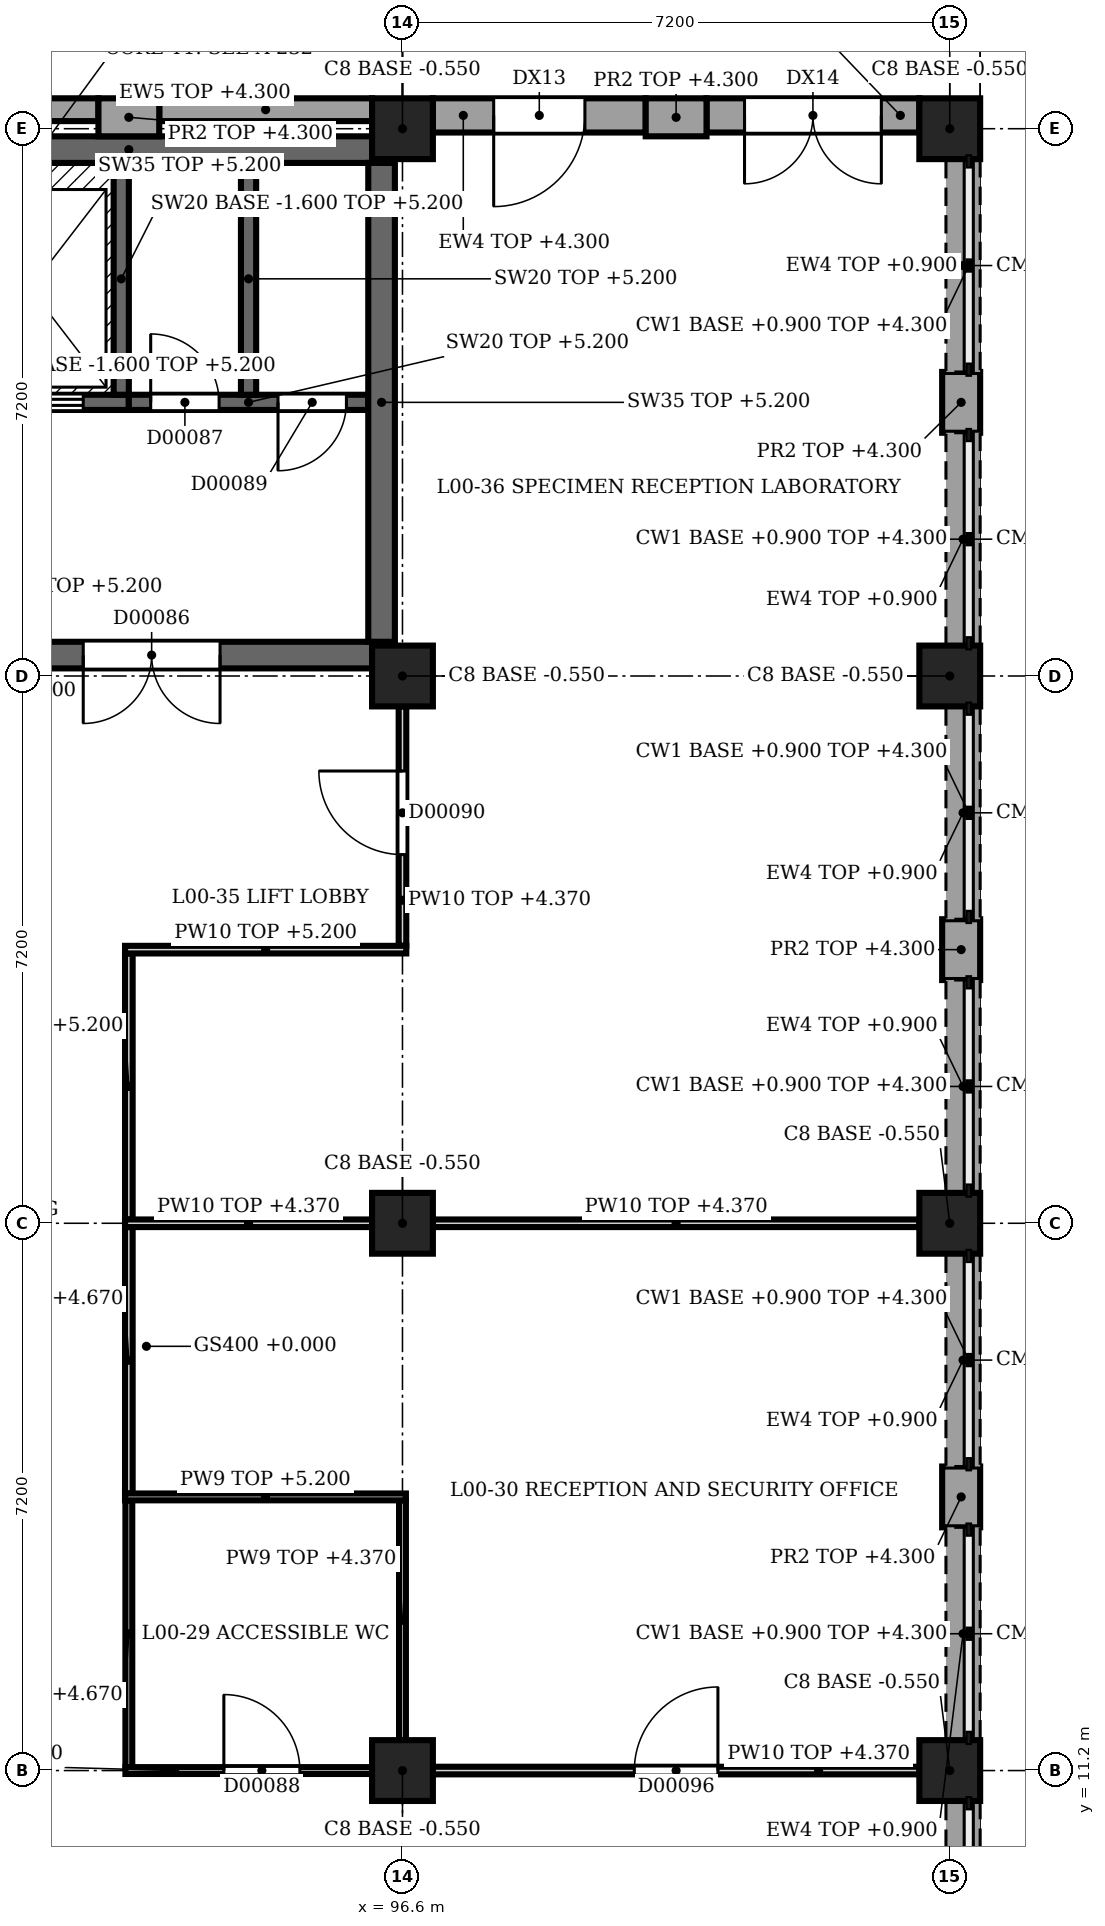
"""IFC4 building model, lengths in metres.
Left out: names, types, materials, properties, quantities, classifications, styles, units other than length and angle.
Written with IfcOpenShell. Run it as: python <this file> out.ifc"""

import sys

from ifc_helpers import new_model, si_unit, direction, frame, frame_2d, origin, origin_2d, place, context, subcontext, project, spatial, rectangle, extrude, element, fill, save


model = new_model("IFC4")
c1 = context("Model", 3, precision=1e-05, world=origin(), true_north=direction((0.0, 1.0)))
c2 = subcontext(c1, "Body", "Model", "MODEL_VIEW")
j1 = project(units=[si_unit("LENGTHUNIT", "METRE"), si_unit("PLANEANGLEUNIT", "RADIAN")], contexts=[c1])
p1 = place(None, origin())
s1 = spatial("IfcSite", under=j1, at=p1, CompositionType="ELEMENT")
p2 = place(p1, origin())
s2 = spatial("IfcBuilding", under=s1, at=p2, CompositionType="ELEMENT")
p3 = place(p2, origin())
s3 = spatial("IfcBuildingStorey", under=s2, at=p3, CompositionType="ELEMENT", Elevation=0.0)
for number, where, z_axis, x_axis in (
    (1, (96.6, 11.2, -0.55), (0.0, 0.0, 1.0), (1.0, 0.0, 0.0)),
    (2, (96.6, 18.4, -0.55), (0.0, 0.0, 1.0), (1.0, 0.0, 0.0)),
    (3, (96.6, 25.6, -0.55), (0.0, 0.0, 1.0), (1.0, 0.0, 0.0)),
    (4, (96.6, 32.8, -0.55), (0.0, 0.0, 1.0), (1.0, 0.0, 0.0)),
    (5, (103.8, 11.2, -0.55), (0.0, 0.0, 1.0), (1.0, 0.0, 0.0)),
    (6, (103.8, 18.4, -0.55), (0.0, 0.0, 1.0), (1.0, 0.0, 0.0)),
    (7, (103.8, 25.6, -0.55), (0.0, 0.0, 1.0), (1.0, 0.0, 0.0)),
    (8, (103.8, 32.8, -0.55), (0.0, 0.0, 1.0), (1.0, 0.0, 0.0)),
):
    element("IfcColumn", number, at=place(p3, frame(where, z_axis=z_axis, x_axis=x_axis)), inside=s3, PredefinedType="COLUMN", context=c2, shape_type="SweptSolid", body=[
        extrude(rectangle(XDim=0.8, YDim=0.8, at=origin_2d()), origin(), (0.0, 0.0, 1.0), 5.95),
    ])
p4 = place(p3, frame((92.6, 32.95, 0.0), z_axis=(0.0, 0.0, 1.0), x_axis=(1.0, 0.0, 0.0)))
e9 = element("IfcWall", 9, at=p4, inside=s3, PredefinedType="SOLIDWALL", context=c2, shape_type="SweptSolid", body=[
    extrude(rectangle(XDim=0.8, YDim=0.5, at=frame_2d((0.4, 0.0))), origin(), (0.0, 0.0, 1.0), 4.3),
])
p5 = place(p3, frame((99.8, 32.95, 0.0), z_axis=(0.0, 0.0, 1.0), x_axis=(1.0, 0.0, 0.0)))
e10 = element("IfcWall", 10, at=p5, inside=s3, PredefinedType="SOLIDWALL", context=c2, shape_type="SweptSolid", body=[
    extrude(rectangle(XDim=0.8, YDim=0.5, at=frame_2d((0.4, 0.0))), origin(), (0.0, 0.0, 1.0), 4.3),
])
for number, where, z_axis, x_axis in (
    (11, (89.8, 33.05, 0.0), (0.0, 0.0, 1.0), (1.0, 0.0, 0.0)),
    (12, (93.4, 33.05, 0.0), (0.0, 0.0, 1.0), (1.0, 0.0, 0.0)),
):
    element("IfcWall", number, at=place(p3, frame(where, z_axis=z_axis, x_axis=x_axis)), inside=s3, PredefinedType="SOLIDWALL", context=c2, shape_type="SweptSolid", body=[
        extrude(rectangle(XDim=2.8, YDim=0.3, at=frame_2d((1.4, 0.0))), origin(), (0.0, 0.0, 1.0), 4.3),
    ])
p6 = place(p3, frame((97.0, 32.975, 0.0), z_axis=(0.0, 0.0, 1.0), x_axis=(1.0, 0.0, 0.0)))
e13 = element("IfcWall", 13, at=p6, inside=s3, PredefinedType="SOLIDWALL", context=c2, shape_type="SweptSolid", body=[
    extrude(rectangle(XDim=2.8, YDim=0.45, at=frame_2d((1.4, 0.0))), origin(), (0.0, 0.0, 1.0), 4.3),
])
p7 = place(p6, frame((0.8, 0.0, 0.0)))
e14 = element("IfcOpeningElement", 14, at=p7, cuts=e13, PredefinedType="OPENING", context=c2, shape_type="SweptSolid", body=[
    extrude(rectangle(XDim=1.2, YDim=2.2, at=frame_2d((0.6, 1.1))), frame((0.0, 0.235, 0.0), z_axis=(0.0, -1.0, 0.0), x_axis=(1.0, 0.0, 0.0)), (0.0, 0.0, 1.0), 0.47),
])
p8 = place(p3, frame((100.6, 32.975, 0.0), z_axis=(0.0, 0.0, 1.0), x_axis=(1.0, 0.0, 0.0)))
e15 = element("IfcWall", 15, at=p8, inside=s3, PredefinedType="SOLIDWALL", context=c2, shape_type="SweptSolid", body=[
    extrude(rectangle(XDim=2.8, YDim=0.45, at=frame_2d((1.4, 0.0))), origin(), (0.0, 0.0, 1.0), 4.3),
])
p9 = place(p8, frame((0.5, 0.0, 0.0)))
e16 = element("IfcOpeningElement", 16, at=p9, cuts=e15, PredefinedType="OPENING", context=c2, shape_type="SweptSolid", body=[
    extrude(rectangle(XDim=1.8, YDim=2.4, at=frame_2d((0.9, 1.2))), frame((0.0, 0.235, 0.0), z_axis=(0.0, -1.0, 0.0), x_axis=(1.0, 0.0, 0.0)), (0.0, 0.0, 1.0), 0.47),
])
p10 = place(p3, frame((103.95, 29.6, 0.0), z_axis=(0.0, 0.0, 1.0), x_axis=(0.0, -1.0, 0.0)))
e17 = element("IfcWall", 17, at=p10, inside=s3, PredefinedType="SOLIDWALL", context=c2, shape_type="SweptSolid", body=[
    extrude(rectangle(XDim=0.8, YDim=0.5, at=frame_2d((0.4, 0.0))), origin(), (0.0, 0.0, 1.0), 4.3),
])
p11 = place(p3, frame((103.95, 22.4, 0.0), z_axis=(0.0, 0.0, 1.0), x_axis=(0.0, -1.0, 0.0)))
e18 = element("IfcWall", 18, at=p11, inside=s3, PredefinedType="SOLIDWALL", context=c2, shape_type="SweptSolid", body=[
    extrude(rectangle(XDim=0.8, YDim=0.5, at=frame_2d((0.4, 0.0))), origin(), (0.0, 0.0, 1.0), 4.3),
])
p12 = place(p3, frame((103.95, 15.2, 0.0), z_axis=(0.0, 0.0, 1.0), x_axis=(0.0, -1.0, 0.0)))
e19 = element("IfcWall", 19, at=p12, inside=s3, PredefinedType="SOLIDWALL", context=c2, shape_type="SweptSolid", body=[
    extrude(rectangle(XDim=0.8, YDim=0.5, at=frame_2d((0.4, 0.0))), origin(), (0.0, 0.0, 1.0), 4.3),
])
p13 = place(p3, frame((103.975, 32.4, 0.0), z_axis=(0.0, 0.0, 1.0), x_axis=(0.0, -1.0, 0.0)))
e20 = element("IfcWall", 20, at=p13, inside=s3, PredefinedType="SOLIDWALL", context=c2, shape_type="SweptSolid", body=[
    extrude(rectangle(XDim=2.8, YDim=0.45, at=frame_2d((1.4, 0.0))), origin(), (0.0, 0.0, 1.0), 0.9),
])
for number, where, z_axis, x_axis in (
    (21, (103.975, 28.8, 0.0), (0.0, 0.0, 1.0), (0.0, -1.0, 0.0)),
    (22, (103.975, 25.2, 0.0), (0.0, 0.0, 1.0), (0.0, -1.0, 0.0)),
    (23, (103.975, 21.6, 0.0), (0.0, 0.0, 1.0), (0.0, -1.0, 0.0)),
    (24, (103.975, 18.0, 0.0), (0.0, 0.0, 1.0), (0.0, -1.0, 0.0)),
):
    element("IfcWall", number, at=place(p3, frame(where, z_axis=z_axis, x_axis=x_axis)), inside=s3, PredefinedType="SOLIDWALL", context=c2, shape_type="SweptSolid", body=[
        extrude(rectangle(XDim=2.8, YDim=0.45, at=frame_2d((1.4, 0.0))), origin(), (0.0, 0.0, 1.0), 0.9),
    ])
p14 = place(p3, frame((103.975, 14.4, 0.0), z_axis=(0.0, 0.0, 1.0), x_axis=(0.0, -1.0, 0.0)))
e25 = element("IfcWall", 25, at=p14, inside=s3, PredefinedType="SOLIDWALL", context=c2, shape_type="SweptSolid", body=[
    extrude(rectangle(XDim=2.8, YDim=0.45, at=frame_2d((1.4, 0.0))), origin(), (0.0, 0.0, 1.0), 0.9),
])
p15 = place(p3, frame((103.975, 10.8, 0.0), z_axis=(0.0, 0.0, 1.0), x_axis=(0.0, -1.0, 0.0)))
e26 = element("IfcWall", 26, at=p15, inside=s3, PredefinedType="SOLIDWALL", context=c2, shape_type="SweptSolid", body=[
    extrude(rectangle(XDim=2.8, YDim=0.45, at=frame_2d((1.4, 0.0))), origin(), (0.0, 0.0, 1.0), 0.9),
])
p16 = place(p3, frame((89.8, 25.875, 0.0), z_axis=(0.0, 0.0, 1.0), x_axis=(1.0, 0.0, 0.0)))
e27 = element("IfcWall", 27, at=p16, inside=s3, PredefinedType="SHEAR", context=c2, shape_type="SweptSolid", body=[
    extrude(rectangle(XDim=6.4, YDim=0.35, at=frame_2d((3.2, 0.0))), origin(), (0.0, 0.0, 1.0), 5.2),
])
p17 = place(p16, frame((2.6, 0.0, 0.0)))
e28 = element("IfcOpeningElement", 28, at=p17, cuts=e27, PredefinedType="OPENING", context=c2, shape_type="SweptSolid", body=[
    extrude(rectangle(XDim=1.8, YDim=2.1, at=frame_2d((0.9, 1.05))), frame((0.0, 0.185, 0.0), z_axis=(0.0, -1.0, 0.0), x_axis=(1.0, 0.0, 0.0)), (0.0, 0.0, 1.0), 0.37),
])
p18 = place(p3, frame((89.8, 32.525, 0.0), z_axis=(0.0, 0.0, 1.0), x_axis=(1.0, 0.0, 0.0)))
e29 = element("IfcWall", 29, at=p18, inside=s3, PredefinedType="SHEAR", context=c2, shape_type="SweptSolid", body=[
    extrude(rectangle(XDim=6.4, YDim=0.35, at=frame_2d((3.2, 0.0))), origin(), (0.0, 0.0, 1.0), 5.2),
])
p19 = place(p3, frame((96.325, 26.05, 0.0), z_axis=(0.0, 0.0, 1.0), x_axis=(0.0, 1.0, 0.0)))
e30 = element("IfcWall", 30, at=p19, inside=s3, PredefinedType="SHEAR", context=c2, shape_type="SweptSolid", body=[
    extrude(rectangle(XDim=6.3, YDim=0.35, at=frame_2d((3.15, 0.0))), origin(), (0.0, 0.0, 1.0), 5.2),
])
p20 = place(p3, frame((93.0, 29.2, -1.6), z_axis=(0.0, 0.0, 1.0), x_axis=(-1.0, 0.0, 0.0)))
e31 = element("IfcWall", 31, at=p20, inside=s3, PredefinedType="SHEAR", context=c2, shape_type="SweptSolid", body=[
    extrude(rectangle(XDim=7.2, YDim=0.2, at=frame_2d((3.6, 0.0))), origin(), (0.0, 0.0, 1.0), 6.8),
])
p21 = place(p20, frame((5.65, 0.0, 1.6)))
e32 = element("IfcOpeningElement", 32, at=p21, cuts=e31, PredefinedType="OPENING", context=c2, shape_type="SweptSolid", body=[
    extrude(rectangle(XDim=1.1, YDim=2.1, at=frame_2d((0.55, 1.05))), frame((0.0, 0.11, 0.0), z_axis=(0.0, -1.0, 0.0), x_axis=(1.0, 0.0, 0.0)), (0.0, 0.0, 1.0), 0.22),
])
p22 = place(p20, frame((3.45, 0.0, 1.6)))
e33 = element("IfcOpeningElement", 33, at=p22, cuts=e31, PredefinedType="OPENING", context=c2, shape_type="SweptSolid", body=[
    extrude(rectangle(XDim=1.1, YDim=2.1, at=frame_2d((0.55, 1.05))), frame((0.0, 0.11, 0.0), z_axis=(0.0, -1.0, 0.0), x_axis=(1.0, 0.0, 0.0)), (0.0, 0.0, 1.0), 0.22),
])
p23 = place(p20, frame((0.6, 0.0, 1.6)))
e34 = element("IfcOpeningElement", 34, at=p23, cuts=e31, PredefinedType="OPENING", context=c2, shape_type="SweptSolid", body=[
    extrude(rectangle(XDim=1.4, YDim=2.1, at=frame_2d((0.7, 1.05))), frame((0.0, 0.11, 0.0), z_axis=(0.0, -1.0, 0.0), x_axis=(1.0, 0.0, 0.0)), (0.0, 0.0, 1.0), 0.22),
])
p24 = place(p3, frame((96.15, 29.2, 0.0), z_axis=(0.0, 0.0, 1.0), x_axis=(-1.0, 0.0, 0.0)))
e35 = element("IfcWall", 35, at=p24, inside=s3, PredefinedType="SHEAR", context=c2, shape_type="SweptSolid", body=[
    extrude(rectangle(XDim=3.15, YDim=0.2, at=frame_2d((1.575, 0.0))), origin(), (0.0, 0.0, 1.0), 5.2),
])
p25 = place(p24, frame((1.962, 0.0, 0.0)))
e36 = element("IfcOpeningElement", 36, at=p25, cuts=e35, PredefinedType="OPENING", context=c2, shape_type="SweptSolid", body=[
    extrude(rectangle(XDim=0.9, YDim=2.1, at=frame_2d((0.45, 1.05))), frame((0.0, 0.11, 0.0), z_axis=(0.0, -1.0, 0.0), x_axis=(1.0, 0.0, 0.0)), (0.0, 0.0, 1.0), 0.22),
])
p26 = place(p24, frame((0.288, 0.0, 0.0)))
e37 = element("IfcOpeningElement", 37, at=p26, cuts=e35, PredefinedType="OPENING", context=c2, shape_type="SweptSolid", body=[
    extrude(rectangle(XDim=0.9, YDim=2.1, at=frame_2d((0.45, 1.05))), frame((0.0, 0.11, 0.0), z_axis=(0.0, -1.0, 0.0), x_axis=(1.0, 0.0, 0.0)), (0.0, 0.0, 1.0), 0.22),
])
p27 = place(p3, frame((92.9, 29.3, -1.6), z_axis=(0.0, 0.0, 1.0), x_axis=(0.0, 1.0, 0.0)))
e38 = element("IfcWall", 38, at=p27, inside=s3, PredefinedType="SHEAR", context=c2, shape_type="SweptSolid", body=[
    extrude(rectangle(XDim=3.05, YDim=0.2, at=frame_2d((1.525, 0.0))), origin(), (0.0, 0.0, 1.0), 6.8),
])
p28 = place(p3, frame((94.575, 29.3, 0.0), z_axis=(0.0, 0.0, 1.0), x_axis=(0.0, 1.0, 0.0)))
e39 = element("IfcWall", 39, at=p28, inside=s3, PredefinedType="SHEAR", context=c2, shape_type="SweptSolid", body=[
    extrude(rectangle(XDim=3.05, YDim=0.2, at=frame_2d((1.525, 0.0))), origin(), (0.0, 0.0, 1.0), 5.2),
])
p29 = place(p3, frame((92.955, 11.2, 0.0), z_axis=(0.0, 0.0, 1.0), x_axis=(1.0, 0.0, 0.0)))
e40 = element("IfcWall", 40, at=p29, inside=s3, PredefinedType="PARTITIONING", context=c2, shape_type="SweptSolid", body=[
    extrude(rectangle(XDim=3.245, YDim=0.09, at=frame_2d((1.623, 0.0))), origin(), (0.0, 0.0, 1.0), 4.37),
])
p30 = place(p29, frame((1.295, 0.0, 0.0)))
e41 = element("IfcOpeningElement", 41, at=p30, cuts=e40, PredefinedType="OPENING", context=c2, shape_type="SweptSolid", body=[
    extrude(rectangle(XDim=1.0, YDim=2.2, at=frame_2d((0.5, 1.1))), frame((0.0, 0.055, 0.0), z_axis=(0.0, -1.0, 0.0), x_axis=(1.0, 0.0, 0.0)), (0.0, 0.0, 1.0), 0.11),
])
p31 = place(p3, frame((97.0, 11.2, 0.0), z_axis=(0.0, 0.0, 1.0), x_axis=(1.0, 0.0, 0.0)))
e42 = element("IfcWall", 42, at=p31, inside=s3, PredefinedType="PARTITIONING", context=c2, shape_type="SweptSolid", body=[
    extrude(rectangle(XDim=6.4, YDim=0.1, at=frame_2d((3.2, 0.0))), origin(), (0.0, 0.0, 1.0), 4.37),
])
p32 = place(p31, frame((2.65, 0.0, 0.0)))
e43 = element("IfcOpeningElement", 43, at=p32, cuts=e42, PredefinedType="OPENING", context=c2, shape_type="SweptSolid", body=[
    extrude(rectangle(XDim=1.1, YDim=2.2, at=frame_2d((0.55, 1.1))), frame((0.0, 0.06, 0.0), z_axis=(0.0, -1.0, 0.0), x_axis=(1.0, 0.0, 0.0)), (0.0, 0.0, 1.0), 0.12),
])
p33 = place(p3, frame((92.95, 14.8, 0.0), z_axis=(0.0, 0.0, 1.0), x_axis=(1.0, 0.0, 0.0)))
e44 = element("IfcWall", 44, at=p33, inside=s3, PredefinedType="PARTITIONING", context=c2, shape_type="SweptSolid", body=[
    extrude(rectangle(XDim=3.695, YDim=0.09, at=frame_2d((1.848, 0.0))), origin(), (0.0, 0.0, 1.0), 5.2),
])
p34 = place(p3, frame((92.95, 18.4, 0.0), z_axis=(0.0, 0.0, 1.0), x_axis=(1.0, 0.0, 0.0)))
e45 = element("IfcWall", 45, at=p34, inside=s3, PredefinedType="PARTITIONING", context=c2, shape_type="SweptSolid", body=[
    extrude(rectangle(XDim=3.25, YDim=0.1, at=frame_2d((1.625, 0.0))), origin(), (0.0, 0.0, 1.0), 4.37),
])
p35 = place(p3, frame((97.0, 18.4, 0.0), z_axis=(0.0, 0.0, 1.0), x_axis=(1.0, 0.0, 0.0)))
e46 = element("IfcWall", 46, at=p35, inside=s3, PredefinedType="PARTITIONING", context=c2, shape_type="SweptSolid", body=[
    extrude(rectangle(XDim=6.4, YDim=0.1, at=frame_2d((3.2, 0.0))), origin(), (0.0, 0.0, 1.0), 4.37),
])
p36 = place(p3, frame((92.95, 22.0, 0.0), z_axis=(0.0, 0.0, 1.0), x_axis=(1.0, 0.0, 0.0)))
e47 = element("IfcWall", 47, at=p36, inside=s3, PredefinedType="PARTITIONING", context=c2, shape_type="SweptSolid", body=[
    extrude(rectangle(XDim=3.7, YDim=0.1, at=frame_2d((1.85, 0.0))), origin(), (0.0, 0.0, 1.0), 5.2),
])
p37 = place(p3, frame((93.0, 11.245, 0.0), z_axis=(0.0, 0.0, 1.0), x_axis=(0.0, 1.0, 0.0)))
e48 = element("IfcWall", 48, at=p37, inside=s3, PredefinedType="PARTITIONING", context=c2, shape_type="SweptSolid", body=[
    extrude(rectangle(XDim=3.51, YDim=0.09, at=frame_2d((1.755, 0.0))), origin(), (0.0, 0.0, 1.0), 4.67),
])
p38 = place(p3, frame((93.0, 14.845, 0.0), z_axis=(0.0, 0.0, 1.0), x_axis=(0.0, 1.0, 0.0)))
e49 = element("IfcWall", 49, at=p38, inside=s3, PredefinedType="PARTITIONING", context=c2, shape_type="SweptSolid", body=[
    extrude(rectangle(XDim=3.505, YDim=0.1, at=frame_2d((1.752, 0.0))), origin(), (0.0, 0.0, 1.0), 4.67),
])
p39 = place(p3, frame((93.0, 18.45, 0.0), z_axis=(0.0, 0.0, 1.0), x_axis=(0.0, 1.0, 0.0)))
e50 = element("IfcWall", 50, at=p39, inside=s3, PredefinedType="PARTITIONING", context=c2, shape_type="SweptSolid", body=[
    extrude(rectangle(XDim=3.5, YDim=0.1, at=frame_2d((1.75, 0.0))), origin(), (0.0, 0.0, 1.0), 5.2),
])
p40 = place(p3, frame((96.6, 11.6, 0.0), z_axis=(0.0, 0.0, 1.0), x_axis=(0.0, 1.0, 0.0)))
e51 = element("IfcWall", 51, at=p40, inside=s3, PredefinedType="PARTITIONING", context=c2, shape_type="SweptSolid", body=[
    extrude(rectangle(XDim=3.155, YDim=0.09, at=frame_2d((1.577, 0.0))), origin(), (0.0, 0.0, 1.0), 4.37),
])
p41 = place(p3, frame((96.6, 25.2, 0.0), z_axis=(0.0, 0.0, 1.0), x_axis=(0.0, -1.0, 0.0)))
e52 = element("IfcWall", 52, at=p41, inside=s3, PredefinedType="PARTITIONING", context=c2, shape_type="SweptSolid", body=[
    extrude(rectangle(XDim=3.15, YDim=0.1, at=frame_2d((1.575, 0.0))), origin(), (0.0, 0.0, 1.0), 4.37),
])
p42 = place(p41, frame((0.85, 0.0, 0.0)))
e53 = element("IfcOpeningElement", 53, at=p42, cuts=e52, PredefinedType="OPENING", context=c2, shape_type="SweptSolid", body=[
    extrude(rectangle(XDim=1.1, YDim=2.2, at=frame_2d((0.55, 1.1))), frame((0.0, 0.06, 0.0), z_axis=(0.0, -1.0, 0.0), x_axis=(1.0, 0.0, 0.0)), (0.0, 0.0, 1.0), 0.12),
])
p43 = place(p7, origin())
e54 = element("IfcDoor", 54, at=p43, inside=s3, OperationType="SINGLE_SWING_LEFT", PredefinedType="DOOR", context=c2, shape_type="SweptSolid", body=[
    extrude(rectangle(XDim=1.2, YDim=2.2, at=frame_2d((0.6, 1.1))), frame((0.0, 0.025, 0.0), z_axis=(0.0, -1.0, 0.0), x_axis=(1.0, 0.0, 0.0)), (0.0, 0.0, 1.0), 0.05),
])
fill(e14, e54)
p44 = place(p9, origin())
e55 = element("IfcDoor", 55, at=p44, inside=s3, OperationType="SINGLE_SWING_LEFT", PredefinedType="DOOR", context=c2, shape_type="SweptSolid", body=[
    extrude(rectangle(XDim=1.8, YDim=2.4, at=frame_2d((0.9, 1.2))), frame((0.0, 0.025, 0.0), z_axis=(0.0, -1.0, 0.0), x_axis=(1.0, 0.0, 0.0)), (0.0, 0.0, 1.0), 0.05),
])
fill(e16, e55)
p45 = place(p17, origin())
e56 = element("IfcDoor", 56, at=p45, inside=s3, OperationType="SINGLE_SWING_LEFT", PredefinedType="DOOR", context=c2, shape_type="SweptSolid", body=[
    extrude(rectangle(XDim=1.8, YDim=2.1, at=frame_2d((0.9, 1.05))), frame((0.0, 0.025, 0.0), z_axis=(0.0, -1.0, 0.0), x_axis=(1.0, 0.0, 0.0)), (0.0, 0.0, 1.0), 0.05),
])
fill(e28, e56)
p46 = place(p23, origin())
e57 = element("IfcDoor", 57, at=p46, inside=s3, OperationType="DOUBLE_DOOR_SLIDING", PredefinedType="DOOR", context=c2, shape_type="SweptSolid", body=[
    extrude(rectangle(XDim=1.4, YDim=2.1, at=frame_2d((0.7, 1.05))), frame((0.0, 0.025, 0.0), z_axis=(0.0, -1.0, 0.0), x_axis=(1.0, 0.0, 0.0)), (0.0, 0.0, 1.0), 0.05),
])
fill(e34, e57)
p47 = place(p25, origin())
e58 = element("IfcDoor", 58, at=p47, inside=s3, OperationType="SINGLE_SWING_RIGHT", PredefinedType="DOOR", context=c2, shape_type="SweptSolid", body=[
    extrude(rectangle(XDim=0.9, YDim=2.1, at=frame_2d((0.45, 1.05))), frame((0.0, 0.025, 0.0), z_axis=(0.0, -1.0, 0.0), x_axis=(1.0, 0.0, 0.0)), (0.0, 0.0, 1.0), 0.05),
])
fill(e36, e58)
p48 = place(p26, origin())
e59 = element("IfcDoor", 59, at=p48, inside=s3, OperationType="SINGLE_SWING_LEFT", PredefinedType="DOOR", context=c2, shape_type="SweptSolid", body=[
    extrude(rectangle(XDim=0.9, YDim=2.1, at=frame_2d((0.45, 1.05))), frame((0.0, 0.025, 0.0), z_axis=(0.0, -1.0, 0.0), x_axis=(1.0, 0.0, 0.0)), (0.0, 0.0, 1.0), 0.05),
])
fill(e37, e59)
p49 = place(p30, origin())
e60 = element("IfcDoor", 60, at=p49, inside=s3, OperationType="SINGLE_SWING_RIGHT", PredefinedType="DOOR", context=c2, shape_type="SweptSolid", body=[
    extrude(rectangle(XDim=1.0, YDim=2.2, at=frame_2d((0.5, 1.1))), frame((0.0, 0.025, 0.0), z_axis=(0.0, -1.0, 0.0), x_axis=(1.0, 0.0, 0.0)), (0.0, 0.0, 1.0), 0.05),
])
fill(e41, e60)
p50 = place(p32, origin())
e61 = element("IfcDoor", 61, at=p50, inside=s3, OperationType="SINGLE_SWING_RIGHT", PredefinedType="DOOR", context=c2, shape_type="SweptSolid", body=[
    extrude(rectangle(XDim=1.1, YDim=2.2, at=frame_2d((0.55, 1.1))), frame((0.0, 0.025, 0.0), z_axis=(0.0, -1.0, 0.0), x_axis=(1.0, 0.0, 0.0)), (0.0, 0.0, 1.0), 0.05),
])
fill(e43, e61)
p51 = place(p42, origin())
e62 = element("IfcDoor", 62, at=p51, inside=s3, OperationType="SINGLE_SWING_LEFT", PredefinedType="DOOR", context=c2, shape_type="SweptSolid", body=[
    extrude(rectangle(XDim=1.1, YDim=2.2, at=frame_2d((0.55, 1.1))), frame((0.0, 0.025, 0.0), z_axis=(0.0, -1.0, 0.0), x_axis=(1.0, 0.0, 0.0)), (0.0, 0.0, 1.0), 0.05),
])
fill(e53, e62)
save(model, sys.argv[1])
